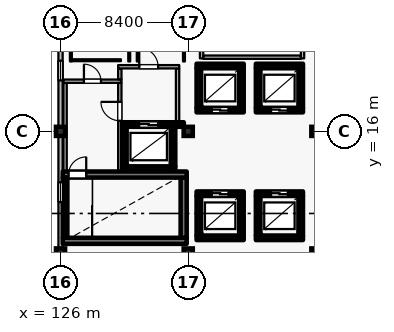
"""IFC4 building model, lengths in metres.
Left out: names, types, materials, properties, quantities, classifications, styles, units other than length and angle.
Written with IfcOpenShell. Run it as: python <this file> out.ifc"""

import sys

from ifc_helpers import new_model, si_unit, direction, frame, frame_2d, origin, origin_2d, place, context, subcontext, project, spatial, rectangle, extrude, element, fill, save


model = new_model("IFC4")
c1 = context("Model", 3, precision=1e-05, world=origin(), true_north=direction((0.0, 1.0)))
c2 = subcontext(c1, "Body", "Model", "MODEL_VIEW")
j1 = project(units=[si_unit("LENGTHUNIT", "METRE"), si_unit("PLANEANGLEUNIT", "RADIAN")], contexts=[c1])
p1 = place(None, origin())
s1 = spatial("IfcSite", under=j1, at=p1, CompositionType="ELEMENT")
p2 = place(p1, origin())
s2 = spatial("IfcBuilding", under=s1, at=p2, CompositionType="ELEMENT")
p3 = place(p2, frame((0.0, 0.0, 47.4)))
s3 = spatial("IfcBuildingStorey", under=s2, at=p3, CompositionType="ELEMENT", Elevation=47.4)
for number, where, z_axis, x_axis in (
    (1, (126.0, 16.0, 0.0), (0.0, 0.0, 1.0), (1.0, 0.0, 0.0)),
    (2, (134.4, 16.0, 0.0), (0.0, 0.0, 1.0), (1.0, 0.0, 0.0)),
    (3, (142.8, 16.0, 0.0), (0.0, 0.0, 1.0), (1.0, 0.0, 0.0)),
    (4, (126.0, 8.0, 0.0), (0.0, 0.0, 1.0), (1.0, 0.0, 0.0)),
    (5, (134.4, 8.0, 0.0), (0.0, 0.0, 1.0), (1.0, 0.0, 0.0)),
    (6, (142.8, 8.0, 0.0), (0.0, 0.0, 1.0), (1.0, 0.0, 0.0)),
):
    element("IfcColumn", number, at=place(p3, frame(where, z_axis=z_axis, x_axis=x_axis)), inside=s3, PredefinedType="COLUMN", context=c2, shape_type="SweptSolid", body=[
        extrude(rectangle(XDim=0.6, YDim=0.6, at=origin_2d()), origin(), (0.0, 0.0, 1.0), 4.2),
    ])
p4 = place(p3, frame((126.0, 8.3, 0.0), z_axis=(0.0, 0.0, 1.0), x_axis=(0.0, 1.0, 0.0)))
e7 = element("IfcWall", 7, at=p4, inside=s3, PredefinedType="SOLIDWALL", context=c2, shape_type="SweptSolid", body=[
    extrude(rectangle(XDim=7.4, YDim=0.28, at=frame_2d((3.7, 0.0))), origin(), (0.0, 0.0, 1.0), 3.3),
])
p5 = place(p4, frame((3.05, 0.0, 0.75)))
e8 = element("IfcOpeningElement", 8, at=p5, cuts=e7, PredefinedType="OPENING", context=c2, shape_type="SweptSolid", body=[
    extrude(rectangle(XDim=1.3, YDim=1.65, at=frame_2d((0.65, 0.825))), frame((0.0, 0.15, 0.0), z_axis=(0.0, -1.0, 0.0), x_axis=(1.0, 0.0, 0.0)), (0.0, 0.0, 1.0), 0.3),
])
p6 = place(p3, frame((126.0, 16.3, 0.0), z_axis=(0.0, 0.0, 1.0), x_axis=(0.0, 1.0, 0.0)))
e9 = element("IfcWall", 9, at=p6, inside=s3, PredefinedType="SOLIDWALL", context=c2, shape_type="SweptSolid", body=[
    extrude(rectangle(XDim=7.4, YDim=0.28, at=frame_2d((3.7, 0.0))), origin(), (0.0, 0.0, 1.0), 3.3),
])
p7 = place(p6, frame((3.05, 0.0, 0.75)))
e10 = element("IfcOpeningElement", 10, at=p7, cuts=e9, PredefinedType="OPENING", context=c2, shape_type="SweptSolid", body=[
    extrude(rectangle(XDim=1.3, YDim=1.65, at=frame_2d((0.65, 0.825))), frame((0.0, 0.15, 0.0), z_axis=(0.0, -1.0, 0.0), x_axis=(1.0, 0.0, 0.0)), (0.0, 0.0, 1.0), 0.3),
])
p8 = place(p3, frame((134.95, 17.4, 0.0), z_axis=(0.0, 0.0, 1.0), x_axis=(1.0, 0.0, 0.0)))
e11 = element("IfcWall", 11, at=p8, inside=s3, PredefinedType="SHEAR", context=c2, shape_type="SweptSolid", body=[
    extrude(rectangle(XDim=3.1, YDim=0.3, at=frame_2d((1.55, 0.0))), origin(), (0.0, 0.0, 1.0), 3.935),
])
p9 = place(p8, frame((1.0, 0.0, 0.0)))
e12 = element("IfcOpeningElement", 12, at=p9, cuts=e11, PredefinedType="OPENING", context=c2, shape_type="SweptSolid", body=[
    extrude(rectangle(XDim=1.1, YDim=2.2, at=frame_2d((0.55, 1.1))), frame((0.0, 0.16, 0.0), z_axis=(0.0, -1.0, 0.0), x_axis=(1.0, 0.0, 0.0)), (0.0, 0.0, 1.0), 0.32),
])
p10 = place(p3, frame((137.9, 17.555, 0.0), z_axis=(0.0, 0.0, 1.0), x_axis=(0.0, 1.0, 0.0)))
e13 = element("IfcWall", 13, at=p10, inside=s3, PredefinedType="SHEAR", context=c2, shape_type="SweptSolid", body=[
    extrude(rectangle(XDim=2.59, YDim=0.3, at=frame_2d((1.295, 0.0))), origin(), (0.0, 0.0, 1.0), 3.935),
])
p11 = place(p3, frame((138.05, 20.3, 0.0), z_axis=(0.0, 0.0, 1.0), x_axis=(-1.0, 0.0, 0.0)))
e14 = element("IfcWall", 14, at=p11, inside=s3, PredefinedType="SHEAR", context=c2, shape_type="SweptSolid", body=[
    extrude(rectangle(XDim=3.1, YDim=0.3, at=frame_2d((1.55, 0.0))), origin(), (0.0, 0.0, 1.0), 3.935),
])
p12 = place(p3, frame((135.1, 20.145, 0.0), z_axis=(0.0, 0.0, 1.0), x_axis=(0.0, -1.0, 0.0)))
e15 = element("IfcWall", 15, at=p12, inside=s3, PredefinedType="SHEAR", context=c2, shape_type="SweptSolid", body=[
    extrude(rectangle(XDim=2.59, YDim=0.3, at=frame_2d((1.295, 0.0))), origin(), (0.0, 0.0, 1.0), 3.935),
])
p13 = place(p3, frame((138.85, 17.4, 0.0), z_axis=(0.0, 0.0, 1.0), x_axis=(1.0, 0.0, 0.0)))
e16 = element("IfcWall", 16, at=p13, inside=s3, PredefinedType="SHEAR", context=c2, shape_type="SweptSolid", body=[
    extrude(rectangle(XDim=3.1, YDim=0.3, at=frame_2d((1.55, 0.0))), origin(), (0.0, 0.0, 1.0), 3.935),
])
p14 = place(p13, frame((1.0, 0.0, 0.0)))
e17 = element("IfcOpeningElement", 17, at=p14, cuts=e16, PredefinedType="OPENING", context=c2, shape_type="SweptSolid", body=[
    extrude(rectangle(XDim=1.1, YDim=2.2, at=frame_2d((0.55, 1.1))), frame((0.0, 0.16, 0.0), z_axis=(0.0, -1.0, 0.0), x_axis=(1.0, 0.0, 0.0)), (0.0, 0.0, 1.0), 0.32),
])
p15 = place(p3, frame((141.8, 17.555, 0.0), z_axis=(0.0, 0.0, 1.0), x_axis=(0.0, 1.0, 0.0)))
e18 = element("IfcWall", 18, at=p15, inside=s3, PredefinedType="SHEAR", context=c2, shape_type="SweptSolid", body=[
    extrude(rectangle(XDim=2.59, YDim=0.3, at=frame_2d((1.295, 0.0))), origin(), (0.0, 0.0, 1.0), 3.935),
])
p16 = place(p3, frame((141.95, 20.3, 0.0), z_axis=(0.0, 0.0, 1.0), x_axis=(-1.0, 0.0, 0.0)))
e19 = element("IfcWall", 19, at=p16, inside=s3, PredefinedType="SHEAR", context=c2, shape_type="SweptSolid", body=[
    extrude(rectangle(XDim=3.1, YDim=0.3, at=frame_2d((1.55, 0.0))), origin(), (0.0, 0.0, 1.0), 3.935),
])
p17 = place(p3, frame((139.0, 20.145, 0.0), z_axis=(0.0, 0.0, 1.0), x_axis=(0.0, -1.0, 0.0)))
e20 = element("IfcWall", 20, at=p17, inside=s3, PredefinedType="SHEAR", context=c2, shape_type="SweptSolid", body=[
    extrude(rectangle(XDim=2.59, YDim=0.3, at=frame_2d((1.295, 0.0))), origin(), (0.0, 0.0, 1.0), 3.935),
])
p18 = place(p3, frame((134.95, 9.0, 0.0), z_axis=(0.0, 0.0, 1.0), x_axis=(1.0, 0.0, 0.0)))
e21 = element("IfcWall", 21, at=p18, inside=s3, PredefinedType="SHEAR", context=c2, shape_type="SweptSolid", body=[
    extrude(rectangle(XDim=3.1, YDim=0.3, at=frame_2d((1.55, 0.0))), origin(), (0.0, 0.0, 1.0), 3.935),
])
p19 = place(p3, frame((137.9, 9.155, 0.0), z_axis=(0.0, 0.0, 1.0), x_axis=(0.0, 1.0, 0.0)))
e22 = element("IfcWall", 22, at=p19, inside=s3, PredefinedType="SHEAR", context=c2, shape_type="SweptSolid", body=[
    extrude(rectangle(XDim=2.59, YDim=0.3, at=frame_2d((1.295, 0.0))), origin(), (0.0, 0.0, 1.0), 3.935),
])
p20 = place(p3, frame((138.05, 11.9, 0.0), z_axis=(0.0, 0.0, 1.0), x_axis=(-1.0, 0.0, 0.0)))
e23 = element("IfcWall", 23, at=p20, inside=s3, PredefinedType="SHEAR", context=c2, shape_type="SweptSolid", body=[
    extrude(rectangle(XDim=3.1, YDim=0.3, at=frame_2d((1.55, 0.0))), origin(), (0.0, 0.0, 1.0), 3.935),
])
p21 = place(p20, frame((1.0, 0.0, 0.0)))
e24 = element("IfcOpeningElement", 24, at=p21, cuts=e23, PredefinedType="OPENING", context=c2, shape_type="SweptSolid", body=[
    extrude(rectangle(XDim=1.1, YDim=2.2, at=frame_2d((0.55, 1.1))), frame((0.0, 0.16, 0.0), z_axis=(0.0, -1.0, 0.0), x_axis=(1.0, 0.0, 0.0)), (0.0, 0.0, 1.0), 0.32),
])
p22 = place(p3, frame((135.1, 11.745, 0.0), z_axis=(0.0, 0.0, 1.0), x_axis=(0.0, -1.0, 0.0)))
e25 = element("IfcWall", 25, at=p22, inside=s3, PredefinedType="SHEAR", context=c2, shape_type="SweptSolid", body=[
    extrude(rectangle(XDim=2.59, YDim=0.3, at=frame_2d((1.295, 0.0))), origin(), (0.0, 0.0, 1.0), 3.935),
])
p23 = place(p3, frame((138.85, 9.0, 0.0), z_axis=(0.0, 0.0, 1.0), x_axis=(1.0, 0.0, 0.0)))
e26 = element("IfcWall", 26, at=p23, inside=s3, PredefinedType="SHEAR", context=c2, shape_type="SweptSolid", body=[
    extrude(rectangle(XDim=3.1, YDim=0.3, at=frame_2d((1.55, 0.0))), origin(), (0.0, 0.0, 1.0), 3.935),
])
p24 = place(p3, frame((141.8, 9.155, 0.0), z_axis=(0.0, 0.0, 1.0), x_axis=(0.0, 1.0, 0.0)))
e27 = element("IfcWall", 27, at=p24, inside=s3, PredefinedType="SHEAR", context=c2, shape_type="SweptSolid", body=[
    extrude(rectangle(XDim=2.59, YDim=0.3, at=frame_2d((1.295, 0.0))), origin(), (0.0, 0.0, 1.0), 3.935),
])
p25 = place(p3, frame((141.95, 11.9, 0.0), z_axis=(0.0, 0.0, 1.0), x_axis=(-1.0, 0.0, 0.0)))
e28 = element("IfcWall", 28, at=p25, inside=s3, PredefinedType="SHEAR", context=c2, shape_type="SweptSolid", body=[
    extrude(rectangle(XDim=3.1, YDim=0.3, at=frame_2d((1.55, 0.0))), origin(), (0.0, 0.0, 1.0), 3.935),
])
p26 = place(p25, frame((1.0, 0.0, 0.0)))
e29 = element("IfcOpeningElement", 29, at=p26, cuts=e28, PredefinedType="OPENING", context=c2, shape_type="SweptSolid", body=[
    extrude(rectangle(XDim=1.1, YDim=2.2, at=frame_2d((0.55, 1.1))), frame((0.0, 0.16, 0.0), z_axis=(0.0, -1.0, 0.0), x_axis=(1.0, 0.0, 0.0)), (0.0, 0.0, 1.0), 0.32),
])
p27 = place(p3, frame((139.0, 11.745, 0.0), z_axis=(0.0, 0.0, 1.0), x_axis=(0.0, -1.0, 0.0)))
e30 = element("IfcWall", 30, at=p27, inside=s3, PredefinedType="SHEAR", context=c2, shape_type="SweptSolid", body=[
    extrude(rectangle(XDim=2.59, YDim=0.3, at=frame_2d((1.295, 0.0))), origin(), (0.0, 0.0, 1.0), 3.935),
])
p28 = place(p3, frame((130.05, 13.55, 0.0), z_axis=(0.0, 0.0, 1.0), x_axis=(1.0, 0.0, 0.0)))
e31 = element("IfcWall", 31, at=p28, inside=s3, PredefinedType="SHEAR", context=c2, shape_type="SweptSolid", body=[
    extrude(rectangle(XDim=3.5, YDim=0.3, at=frame_2d((1.75, 0.0))), origin(), (0.0, 0.0, 1.0), 3.935),
])
p29 = place(p3, frame((133.4, 13.705, 0.0), z_axis=(0.0, 0.0, 1.0), x_axis=(0.0, 1.0, 0.0)))
e32 = element("IfcWall", 32, at=p29, inside=s3, PredefinedType="SHEAR", context=c2, shape_type="SweptSolid", body=[
    extrude(rectangle(XDim=2.59, YDim=0.3, at=frame_2d((1.295, 0.0))), origin(), (0.0, 0.0, 1.0), 3.935),
])
p30 = place(p3, frame((134.11, 16.45, 0.0), z_axis=(0.0, 0.0, 1.0), x_axis=(-1.0, 0.0, 0.0)))
e33 = element("IfcWall", 33, at=p30, inside=s3, PredefinedType="SHEAR", context=c2, shape_type="SweptSolid", body=[
    extrude(rectangle(XDim=4.06, YDim=0.3, at=frame_2d((2.03, 0.0))), origin(), (0.0, 0.0, 1.0), 3.935),
])
p31 = place(p30, frame((1.685, 0.0, 0.0)))
e34 = element("IfcOpeningElement", 34, at=p31, cuts=e33, PredefinedType="OPENING", context=c2, shape_type="SweptSolid", body=[
    extrude(rectangle(XDim=1.25, YDim=2.25, at=frame_2d((0.625, 1.125))), frame((0.0, 0.16, 0.0), z_axis=(0.0, -1.0, 0.0), x_axis=(1.0, 0.0, 0.0)), (0.0, 0.0, 1.0), 0.32),
])
p32 = place(p3, frame((130.2, 16.295, 0.0), z_axis=(0.0, 0.0, 1.0), x_axis=(0.0, -1.0, 0.0)))
e35 = element("IfcWall", 35, at=p32, inside=s3, PredefinedType="SHEAR", context=c2, shape_type="SweptSolid", body=[
    extrude(rectangle(XDim=2.59, YDim=0.3, at=frame_2d((1.295, 0.0))), origin(), (0.0, 0.0, 1.0), 3.935),
])
p33 = place(p3, frame((126.15, 8.8, 0.0), z_axis=(0.0, 0.0, 1.0), x_axis=(1.0, 0.0, 0.0)))
e36 = element("IfcWall", 36, at=p33, inside=s3, PredefinedType="SHEAR", context=c2, shape_type="SweptSolid", body=[
    extrude(rectangle(XDim=8.15, YDim=0.4, at=frame_2d((4.075, 0.0))), origin(), (0.0, 0.0, 1.0), 3.935),
])
p34 = place(p3, frame((134.1, 9.005, 0.0), z_axis=(0.0, 0.0, 1.0), x_axis=(0.0, 1.0, 0.0)))
e37 = element("IfcWall", 37, at=p34, inside=s3, PredefinedType="SHEAR", context=c2, shape_type="SweptSolid", body=[
    extrude(rectangle(XDim=3.95, YDim=0.4, at=frame_2d((1.975, 0.0))), origin(), (0.0, 0.0, 1.0), 3.935),
])
p35 = place(p3, frame((126.15, 13.16, 0.0), z_axis=(0.0, 0.0, 1.0), x_axis=(1.0, 0.0, 0.0)))
e38 = element("IfcWall", 38, at=p35, inside=s3, PredefinedType="SHEAR", context=c2, shape_type="SweptSolid", body=[
    extrude(rectangle(XDim=8.15, YDim=0.4, at=frame_2d((4.075, 0.0))), origin(), (0.0, 0.0, 1.0), 3.935),
])
p36 = place(p35, frame((0.38, 0.0, 0.0)))
e39 = element("IfcOpeningElement", 39, at=p36, cuts=e38, PredefinedType="OPENING", context=c2, shape_type="SweptSolid", body=[
    extrude(rectangle(XDim=1.16, YDim=2.2, at=frame_2d((0.58, 1.1))), frame((0.0, 0.21, 0.0), z_axis=(0.0, -1.0, 0.0), x_axis=(1.0, 0.0, 0.0)), (0.0, 0.0, 1.0), 0.42),
])
p37 = place(p3, frame((126.3, 9.005, 0.0), z_axis=(0.0, 0.0, 1.0), x_axis=(0.0, 1.0, 0.0)))
e40 = element("IfcWall", 40, at=p37, inside=s3, PredefinedType="SHEAR", context=c2, shape_type="SweptSolid", body=[
    extrude(rectangle(XDim=3.95, YDim=0.3, at=frame_2d((1.975, 0.0))), origin(), (0.0, 0.0, 1.0), 3.935),
])
p38 = place(p3, frame((126.3, 13.365, 0.0), z_axis=(0.0, 0.0, 1.0), x_axis=(0.0, 1.0, 0.0)))
e41 = element("IfcWall", 41, at=p38, inside=s3, PredefinedType="PARTITIONING", context=c2, shape_type="SweptSolid", body=[
    extrude(rectangle(XDim=5.82, YDim=0.22, at=frame_2d((2.91, 0.0))), origin(), (0.0, 0.0, 1.0), 3.935),
])
p39 = place(p3, frame((126.19, 19.3, 0.0), z_axis=(0.0, 0.0, 1.0), x_axis=(1.0, 0.0, 0.0)))
e42 = element("IfcWall", 42, at=p39, inside=s3, PredefinedType="PARTITIONING", context=c2, shape_type="SweptSolid", body=[
    extrude(rectangle(XDim=3.82, YDim=0.22, at=frame_2d((1.91, 0.0))), origin(), (0.0, 0.0, 1.0), 3.935),
])
p40 = place(p39, frame((1.35, 0.0, 0.0)))
e43 = element("IfcOpeningElement", 43, at=p40, cuts=e42, PredefinedType="OPENING", context=c2, shape_type="SweptSolid", body=[
    extrude(rectangle(XDim=1.12, YDim=2.2, at=frame_2d((0.56, 1.1))), frame((0.0, 0.12, 0.0), z_axis=(0.0, -1.0, 0.0), x_axis=(1.0, 0.0, 0.0)), (0.0, 0.0, 1.0), 0.24),
])
p41 = place(p3, frame((129.9, 13.365, 0.0), z_axis=(0.0, 0.0, 1.0), x_axis=(0.0, 1.0, 0.0)))
e44 = element("IfcWall", 44, at=p41, inside=s3, PredefinedType="PARTITIONING", context=c2, shape_type="SweptSolid", body=[
    extrude(rectangle(XDim=5.82, YDim=0.22, at=frame_2d((2.91, 0.0))), origin(), (0.0, 0.0, 1.0), 3.935),
])
p42 = place(p41, frame((3.335, 0.0, 0.0)))
e45 = element("IfcOpeningElement", 45, at=p42, cuts=e44, PredefinedType="OPENING", context=c2, shape_type="SweptSolid", body=[
    extrude(rectangle(XDim=1.24, YDim=2.2, at=frame_2d((0.62, 1.1))), frame((0.0, 0.12, 0.0), z_axis=(0.0, -1.0, 0.0), x_axis=(1.0, 0.0, 0.0)), (0.0, 0.0, 1.0), 0.24),
])
p43 = place(p3, frame((129.9, 19.415, 0.0), z_axis=(0.0, 0.0, 1.0), x_axis=(0.0, 1.0, 0.0)))
e46 = element("IfcWall", 46, at=p43, inside=s3, PredefinedType="PARTITIONING", context=c2, shape_type="SweptSolid", body=[
    extrude(rectangle(XDim=0.72, YDim=0.22, at=frame_2d((0.36, 0.0))), origin(), (0.0, 0.0, 1.0), 3.935),
])
p44 = place(p3, frame((133.7, 16.605, 0.0), z_axis=(0.0, 0.0, 1.0), x_axis=(0.0, 1.0, 0.0)))
e47 = element("IfcWall", 47, at=p44, inside=s3, PredefinedType="PARTITIONING", context=c2, shape_type="SweptSolid", body=[
    extrude(rectangle(XDim=3.53, YDim=0.22, at=frame_2d((1.765, 0.0))), origin(), (0.0, 0.0, 1.0), 3.935),
])
p45 = place(p3, frame((129.79, 20.25, 0.0), z_axis=(0.0, 0.0, 1.0), x_axis=(1.0, 0.0, 0.0)))
e48 = element("IfcWall", 48, at=p45, inside=s3, PredefinedType="PARTITIONING", context=c2, shape_type="SweptSolid", body=[
    extrude(rectangle(XDim=4.02, YDim=0.22, at=frame_2d((2.01, 0.0))), origin(), (0.0, 0.0, 1.0), 3.935),
])
p46 = place(p45, frame((1.39, 0.0, 0.0)))
e49 = element("IfcOpeningElement", 49, at=p46, cuts=e48, PredefinedType="OPENING", context=c2, shape_type="SweptSolid", body=[
    extrude(rectangle(XDim=1.24, YDim=2.2, at=frame_2d((0.62, 1.1))), frame((0.0, 0.12, 0.0), z_axis=(0.0, -1.0, 0.0), x_axis=(1.0, 0.0, 0.0)), (0.0, 0.0, 1.0), 0.24),
])
for number, where, z_axis, x_axis in (
    (50, (135.28, 20.8, 0.0), (0.0, 0.0, 1.0), (0.0, 1.0, 0.0)),
    (51, (141.92, 20.8, 0.0), (0.0, 0.0, 1.0), (0.0, 1.0, 0.0)),
):
    element("IfcWall", number, at=place(p3, frame(where, z_axis=z_axis, x_axis=x_axis)), inside=s3, PredefinedType="PARTITIONING", context=c2, shape_type="SweptSolid", body=[
        extrude(rectangle(XDim=2.348, YDim=0.22, at=frame_2d((1.174, 0.0))), origin(), (0.0, 0.0, 1.0), 3.935),
    ])
p47 = place(p3, frame((135.39, 20.88, 0.0), z_axis=(0.0, 0.0, 1.0), x_axis=(1.0, 0.0, 0.0)))
e52 = element("IfcWall", 52, at=p47, inside=s3, PredefinedType="PARTITIONING", context=c2, shape_type="SweptSolid", body=[
    extrude(rectangle(XDim=6.42, YDim=0.22, at=frame_2d((3.21, 0.0))), origin(), (0.0, 0.0, 1.0), 3.935),
])
for number, where, z_axis, x_axis in (
    (53, (126.68, 20.6, 0.0), (0.0, 0.0, 1.0), (0.0, 1.0, 0.0)),
    (54, (130.52, 20.6, 0.0), (0.0, 0.0, 1.0), (0.0, 1.0, 0.0)),
):
    element("IfcWall", number, at=place(p3, frame(where, z_axis=z_axis, x_axis=x_axis)), inside=s3, PredefinedType="PARTITIONING", context=c2, shape_type="SweptSolid", body=[
        extrude(rectangle(XDim=2.396, YDim=0.125, at=frame_2d((1.198, 0.0))), origin(), (0.0, 0.0, 1.0), 3.935),
    ])
p48 = place(p3, frame((126.742, 20.68, 0.0), z_axis=(0.0, 0.0, 1.0), x_axis=(1.0, 0.0, 0.0)))
e55 = element("IfcWall", 55, at=p48, inside=s3, PredefinedType="PARTITIONING", context=c2, shape_type="SweptSolid", body=[
    extrude(rectangle(XDim=3.228, YDim=0.125, at=frame_2d((1.614, 0.0))), origin(), (0.0, 0.0, 1.0), 3.935),
])
for number, where, z_axis, x_axis in (
    (56, (131.08, 20.6, 0.0), (0.0, 0.0, 1.0), (0.0, 1.0, 0.0)),
    (57, (134.12, 20.6, 0.0), (0.0, 0.0, 1.0), (0.0, 1.0, 0.0)),
):
    element("IfcWall", number, at=place(p3, frame(where, z_axis=z_axis, x_axis=x_axis)), inside=s3, PredefinedType="PARTITIONING", context=c2, shape_type="SweptSolid", body=[
        extrude(rectangle(XDim=2.396, YDim=0.125, at=frame_2d((1.198, 0.0))), origin(), (0.0, 0.0, 1.0), 3.935),
    ])
p49 = place(p5, origin())
e58 = element("IfcWindow", 58, at=p49, inside=s3, PartitioningType="SINGLE_PANEL", PredefinedType="WINDOW", context=c2, shape_type="SweptSolid", body=[
    extrude(rectangle(XDim=1.3, YDim=1.65, at=frame_2d((0.65, 0.825))), frame((0.0, 0.03, 0.0), z_axis=(0.0, -1.0, 0.0), x_axis=(1.0, 0.0, 0.0)), (0.0, 0.0, 1.0), 0.06),
])
fill(e8, e58)
p50 = place(p7, origin())
e59 = element("IfcWindow", 59, at=p50, inside=s3, PartitioningType="SINGLE_PANEL", PredefinedType="WINDOW", context=c2, shape_type="SweptSolid", body=[
    extrude(rectangle(XDim=1.3, YDim=1.65, at=frame_2d((0.65, 0.825))), frame((0.0, 0.03, 0.0), z_axis=(0.0, -1.0, 0.0), x_axis=(1.0, 0.0, 0.0)), (0.0, 0.0, 1.0), 0.06),
])
fill(e10, e59)
p51 = place(p9, origin())
e60 = element("IfcDoor", 60, at=p51, inside=s3, OperationType="DOUBLE_DOOR_SLIDING", PredefinedType="DOOR", context=c2, shape_type="SweptSolid", body=[
    extrude(rectangle(XDim=1.1, YDim=2.2, at=frame_2d((0.55, 1.1))), frame((0.0, 0.025, 0.0), z_axis=(0.0, -1.0, 0.0), x_axis=(1.0, 0.0, 0.0)), (0.0, 0.0, 1.0), 0.05),
])
fill(e12, e60)
p52 = place(p14, origin())
e61 = element("IfcDoor", 61, at=p52, inside=s3, OperationType="DOUBLE_DOOR_SLIDING", PredefinedType="DOOR", context=c2, shape_type="SweptSolid", body=[
    extrude(rectangle(XDim=1.1, YDim=2.2, at=frame_2d((0.55, 1.1))), frame((0.0, 0.025, 0.0), z_axis=(0.0, -1.0, 0.0), x_axis=(1.0, 0.0, 0.0)), (0.0, 0.0, 1.0), 0.05),
])
fill(e17, e61)
p53 = place(p21, origin())
e62 = element("IfcDoor", 62, at=p53, inside=s3, OperationType="DOUBLE_DOOR_SLIDING", PredefinedType="DOOR", context=c2, shape_type="SweptSolid", body=[
    extrude(rectangle(XDim=1.1, YDim=2.2, at=frame_2d((0.55, 1.1))), frame((0.0, 0.025, 0.0), z_axis=(0.0, -1.0, 0.0), x_axis=(1.0, 0.0, 0.0)), (0.0, 0.0, 1.0), 0.05),
])
fill(e24, e62)
p54 = place(p26, origin())
e63 = element("IfcDoor", 63, at=p54, inside=s3, OperationType="DOUBLE_DOOR_SLIDING", PredefinedType="DOOR", context=c2, shape_type="SweptSolid", body=[
    extrude(rectangle(XDim=1.1, YDim=2.2, at=frame_2d((0.55, 1.1))), frame((0.0, 0.025, 0.0), z_axis=(0.0, -1.0, 0.0), x_axis=(1.0, 0.0, 0.0)), (0.0, 0.0, 1.0), 0.05),
])
fill(e29, e63)
p55 = place(p31, origin())
e64 = element("IfcDoor", 64, at=p55, inside=s3, OperationType="DOUBLE_DOOR_SLIDING", PredefinedType="DOOR", context=c2, shape_type="SweptSolid", body=[
    extrude(rectangle(XDim=1.25, YDim=2.25, at=frame_2d((0.625, 1.125))), frame((0.0, 0.025, 0.0), z_axis=(0.0, -1.0, 0.0), x_axis=(1.0, 0.0, 0.0)), (0.0, 0.0, 1.0), 0.05),
])
fill(e34, e64)
p56 = place(p36, origin())
e65 = element("IfcDoor", 65, at=p56, inside=s3, OperationType="SINGLE_SWING_RIGHT", PredefinedType="DOOR", context=c2, shape_type="SweptSolid", body=[
    extrude(rectangle(XDim=1.16, YDim=2.2, at=frame_2d((0.58, 1.1))), frame((0.0, 0.025, 0.0), z_axis=(0.0, -1.0, 0.0), x_axis=(1.0, 0.0, 0.0)), (0.0, 0.0, 1.0), 0.05),
])
fill(e39, e65)
p57 = place(p40, origin())
e66 = element("IfcDoor", 66, at=p57, inside=s3, OperationType="SINGLE_SWING_LEFT", PredefinedType="DOOR", context=c2, shape_type="SweptSolid", body=[
    extrude(rectangle(XDim=1.12, YDim=2.2, at=frame_2d((0.56, 1.1))), frame((0.0, 0.025, 0.0), z_axis=(0.0, -1.0, 0.0), x_axis=(1.0, 0.0, 0.0)), (0.0, 0.0, 1.0), 0.05),
])
fill(e43, e66)
p58 = place(p42, origin())
e67 = element("IfcDoor", 67, at=p58, inside=s3, OperationType="SINGLE_SWING_RIGHT", PredefinedType="DOOR", context=c2, shape_type="SweptSolid", body=[
    extrude(rectangle(XDim=1.24, YDim=2.2, at=frame_2d((0.62, 1.1))), frame((0.0, 0.025, 0.0), z_axis=(0.0, -1.0, 0.0), x_axis=(1.0, 0.0, 0.0)), (0.0, 0.0, 1.0), 0.05),
])
fill(e45, e67)
p59 = place(p46, origin())
e68 = element("IfcDoor", 68, at=p59, inside=s3, OperationType="SINGLE_SWING_LEFT", PredefinedType="DOOR", context=c2, shape_type="SweptSolid", body=[
    extrude(rectangle(XDim=1.24, YDim=2.2, at=frame_2d((0.62, 1.1))), frame((0.0, 0.025, 0.0), z_axis=(0.0, -1.0, 0.0), x_axis=(1.0, 0.0, 0.0)), (0.0, 0.0, 1.0), 0.05),
])
fill(e49, e68)
save(model, sys.argv[1])
